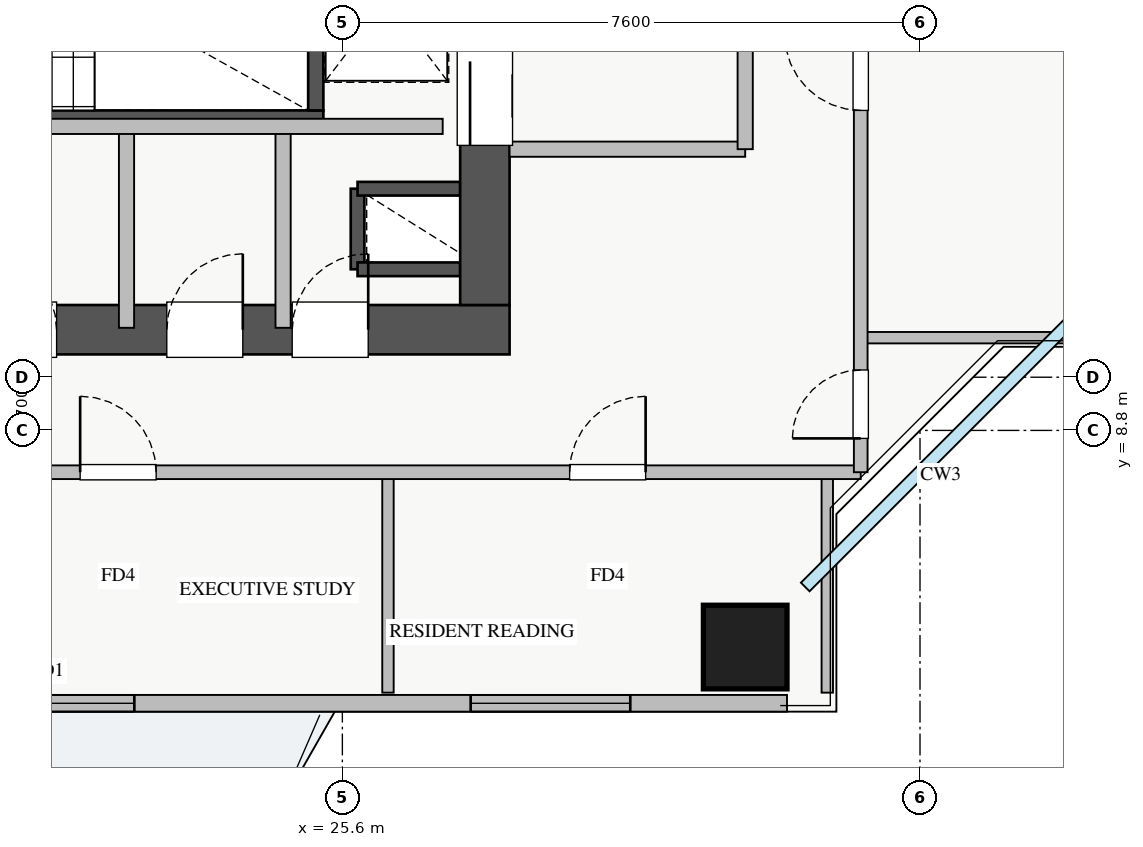
"""IFC4 building model, lengths in metres.
Left out: names, types, materials, properties, quantities, classifications, styles, units other than length and angle.
Written with IfcOpenShell. Run it as: python <this file> out.ifc"""

import sys

from ifc_helpers import new_model, si_unit, direction, frame, frame_2d, origin, origin_2d, place, context, subcontext, project, spatial, rectangle, extrude, source, transform, mapped, element, fill, save


model = new_model("IFC4")
c1 = context("Model", 3, precision=1e-05, world=origin(), true_north=direction((0.0, 1.0)))
c2 = subcontext(c1, "Body", "Model", "MODEL_VIEW")
j1 = project(units=[si_unit("LENGTHUNIT", "METRE"), si_unit("PLANEANGLEUNIT", "RADIAN")], contexts=[c1])
p1 = place(None, origin())
s1 = spatial("IfcSite", under=j1, at=p1, CompositionType="ELEMENT")
p2 = place(p1, origin())
s2 = spatial("IfcBuilding", under=s1, at=p2, CompositionType="ELEMENT")
p3 = place(p2, frame((0.0, 0.0, 119.75)))
s3 = spatial("IfcBuildingStorey", under=s2, at=p3, CompositionType="ELEMENT", Elevation=119.75)
p4 = place(p3, frame((25.8, 10.92, 0.0), z_axis=(0.0, 0.0, 1.0), x_axis=(0.0, 1.0, 0.0)))
e1 = element("IfcWall", 1, at=p4, inside=s3, PredefinedType="SHEAR", context=c2, shape_type="SweptSolid", body=[
    extrude(rectangle(XDim=1.06, YDim=0.18, at=frame_2d((0.53, 0.0))), origin(), (0.0, 0.0, 1.0), 3.07),
])
for number, where, z_axis, x_axis in (
    (2, (25.8, 11.98, 0.0), (0.0, 0.0, 1.0), (1.0, 0.0, 0.0)),
    (3, (25.8, 10.92, 0.0), (0.0, 0.0, 1.0), (1.0, 0.0, 0.0)),
):
    element("IfcWall", number, at=place(p3, frame(where, z_axis=z_axis, x_axis=x_axis)), inside=s3, PredefinedType="SHEAR", context=c2, shape_type="SweptSolid", body=[
        extrude(rectangle(XDim=1.35, YDim=0.18, at=frame_2d((0.675, 0.0))), origin(), (0.0, 0.0, 1.0), 3.07),
    ])
p5 = place(p3, frame((18.2, 12.91, 0.0), z_axis=(0.0, 0.0, 1.0), x_axis=(1.0, 0.0, 0.0)))
e4 = element("IfcWall", 4, at=p5, inside=s3, PredefinedType="SHEAR", context=c2, shape_type="SweptSolid", body=[
    extrude(rectangle(XDim=7.15, YDim=0.2, at=frame_2d((3.575, 0.0))), origin(), (0.0, 0.0, 1.0), 3.25),
])
p6 = place(p5, frame((0.35, 0.0, 0.0)))
e5 = element("IfcOpeningElement", 5, at=p6, cuts=e4, PredefinedType="OPENING", context=c2, shape_type="SweptSolid", body=[
    extrude(rectangle(XDim=1.1, YDim=2.05, at=frame_2d((0.55, 1.025))), frame((0.0, 0.11, 0.0), z_axis=(0.0, -1.0, 0.0), x_axis=(1.0, 0.0, 0.0)), (0.0, 0.0, 1.0), 0.22),
])
p7 = place(p3, frame((25.25, 13.01, 0.0), z_axis=(0.0, 0.0, 1.0), x_axis=(0.0, 1.0, 0.0)))
e6 = element("IfcWall", 6, at=p7, inside=s3, PredefinedType="SHEAR", context=c2, shape_type="SweptSolid", body=[
    extrude(rectangle(XDim=2.94, YDim=0.2, at=frame_2d((1.47, 0.0))), origin(), (0.0, 0.0, 1.0), 3.25),
])
p8 = place(p3, frame((10.2, 10.125, 0.0), z_axis=(0.0, 0.0, 1.0), x_axis=(1.0, 0.0, 0.0)))
e7 = element("IfcWall", 7, at=p8, inside=s3, PredefinedType="SHEAR", context=c2, shape_type="SweptSolid", body=[
    extrude(rectangle(XDim=17.6, YDim=0.65, at=frame_2d((8.8, 0.0))), origin(), (0.0, 0.0, 1.0), 3.25),
])
p9 = place(p8, frame((1.15, 0.0, 0.0)))
e8 = element("IfcOpeningElement", 8, at=p9, cuts=e7, PredefinedType="OPENING", context=c2, shape_type="SweptSolid", body=[
    extrude(rectangle(XDim=1.1, YDim=2.05, at=frame_2d((0.55, 1.025))), frame((0.0, 0.335, 0.0), z_axis=(0.0, -1.0, 0.0), x_axis=(1.0, 0.0, 0.0)), (0.0, 0.0, 1.0), 0.67),
])
p10 = place(p8, frame((8.3, 0.0, 0.0)))
e9 = element("IfcOpeningElement", 9, at=p10, cuts=e7, PredefinedType="OPENING", context=c2, shape_type="SweptSolid", body=[
    extrude(rectangle(XDim=1.1, YDim=2.05, at=frame_2d((0.55, 1.025))), frame((0.0, 0.335, 0.0), z_axis=(0.0, -1.0, 0.0), x_axis=(1.0, 0.0, 0.0)), (0.0, 0.0, 1.0), 0.67),
])
p11 = place(p8, frame((4.9, 0.0, 0.0)))
e10 = element("IfcOpeningElement", 10, at=p11, cuts=e7, PredefinedType="OPENING", context=c2, shape_type="SweptSolid", body=[
    extrude(rectangle(XDim=1.1, YDim=2.05, at=frame_2d((0.55, 1.025))), frame((0.0, 0.335, 0.0), z_axis=(0.0, -1.0, 0.0), x_axis=(1.0, 0.0, 0.0)), (0.0, 0.0, 1.0), 0.67),
])
p12 = place(p8, frame((14.74, 0.0, 0.0)))
e11 = element("IfcOpeningElement", 11, at=p12, cuts=e7, PredefinedType="OPENING", context=c2, shape_type="SweptSolid", body=[
    extrude(rectangle(XDim=1.0, YDim=2.05, at=frame_2d((0.5, 1.025))), frame((0.0, 0.335, 0.0), z_axis=(0.0, -1.0, 0.0), x_axis=(1.0, 0.0, 0.0)), (0.0, 0.0, 1.0), 0.67),
])
p13 = place(p8, frame((10.64, 0.0, 0.0)))
e12 = element("IfcOpeningElement", 12, at=p13, cuts=e7, PredefinedType="OPENING", context=c2, shape_type="SweptSolid", body=[
    extrude(rectangle(XDim=1.0, YDim=2.05, at=frame_2d((0.5, 1.025))), frame((0.0, 0.335, 0.0), z_axis=(0.0, -1.0, 0.0), x_axis=(1.0, 0.0, 0.0)), (0.0, 0.0, 1.0), 0.67),
])
p14 = place(p8, frame((13.09, 0.0, 0.0)))
e13 = element("IfcOpeningElement", 13, at=p14, cuts=e7, PredefinedType="OPENING", context=c2, shape_type="SweptSolid", body=[
    extrude(rectangle(XDim=1.0, YDim=2.05, at=frame_2d((0.5, 1.025))), frame((0.0, 0.335, 0.0), z_axis=(0.0, -1.0, 0.0), x_axis=(1.0, 0.0, 0.0)), (0.0, 0.0, 1.0), 0.67),
])
p15 = place(p3, frame((27.475, 10.45, 0.0), z_axis=(0.0, 0.0, 1.0), x_axis=(0.0, 1.0, 0.0)))
e14 = element("IfcWall", 14, at=p15, inside=s3, PredefinedType="SHEAR", context=c2, shape_type="SweptSolid", body=[
    extrude(rectangle(XDim=5.9, YDim=0.65, at=frame_2d((2.95, 0.0))), origin(), (0.0, 0.0, 1.0), 3.25),
])
p16 = place(p15, frame((2.1, 0.0, 0.0)))
e15 = element("IfcOpeningElement", 15, at=p16, cuts=e14, PredefinedType="OPENING", context=c2, shape_type="SweptSolid", body=[
    extrude(rectangle(XDim=1.3, YDim=2.05, at=frame_2d((0.65, 1.025))), frame((0.0, 0.335, 0.0), z_axis=(0.0, -1.0, 0.0), x_axis=(1.0, 0.0, 0.0)), (0.0, 0.0, 1.0), 0.67),
])
m1 = source(origin(), c2, "Body", "SweptSolid", [
    extrude(rectangle(XDim=1.1, YDim=1.1, at=origin_2d()), origin(), (0.0, 0.0, 1.0), 3.25),
])
p17 = place(p3, frame((30.9, 5.95, 0.0), z_axis=(0.0, 0.0, 1.0), x_axis=(1.0, 0.0, 0.0)))
e16 = element("IfcColumn", 16, at=p17, inside=s3, PredefinedType="COLUMN", context=c2, shape_type="MappedRepresentation", body=[
    mapped(m1, transform((0.0, 0.0, 0.0), x_axis=(1.0, 0.0, 0.0), y_axis=(0.0, 1.0, 0.0), z_axis=(0.0, 0.0, 1.0), scale=1.0)),
])
p18 = place(p3, frame((6.55, 5.21, 0.0), z_axis=(0.0, 0.0, 1.0), x_axis=(1.0, 0.0, 0.0)))
e17 = element("IfcWall", 17, at=p18, inside=s3, PredefinedType="STANDARD", context=c2, shape_type="SweptSolid", body=[
    extrude(rectangle(XDim=24.9, YDim=0.22, at=frame_2d((12.45, 0.0))), origin(), (0.0, 0.0, 1.0), 2.61),
])
p19 = place(p18, frame((13.3, 0.0, 0.0)))
e18 = element("IfcOpeningElement", 18, at=p19, cuts=e17, PredefinedType="OPENING", context=c2, shape_type="SweptSolid", body=[
    extrude(rectangle(XDim=1.2, YDim=2.1, at=frame_2d((0.6, 1.05))), frame((0.0, 0.12, 0.0), z_axis=(0.0, -1.0, 0.0), x_axis=(1.0, 0.0, 0.0)), (0.0, 0.0, 1.0), 0.24),
])
p20 = place(p18, frame((0.258, 0.0, 0.9)))
e19 = element("IfcOpeningElement", 19, at=p20, cuts=e17, PredefinedType="OPENING", context=c2, shape_type="SweptSolid", body=[
    extrude(rectangle(XDim=1.8, YDim=1.5, at=frame_2d((0.9, 0.75))), frame((0.0, 0.12, 0.0), z_axis=(0.0, -1.0, 0.0), x_axis=(1.0, 0.0, 0.0)), (0.0, 0.0, 1.0), 0.24),
])
p21 = place(p18, frame((9.775, 0.0, 0.9)))
e20 = element("IfcOpeningElement", 20, at=p21, cuts=e17, PredefinedType="OPENING", context=c2, shape_type="SweptSolid", body=[
    extrude(rectangle(XDim=1.8, YDim=1.5, at=frame_2d((0.9, 0.75))), frame((0.0, 0.12, 0.0), z_axis=(0.0, -1.0, 0.0), x_axis=(1.0, 0.0, 0.0)), (0.0, 0.0, 1.0), 0.24),
])
p22 = place(p18, frame((14.813, 0.0, 0.9)))
e21 = element("IfcOpeningElement", 21, at=p22, cuts=e17, PredefinedType="OPENING", context=c2, shape_type="SweptSolid", body=[
    extrude(rectangle(XDim=1.5, YDim=1.45, at=frame_2d((0.75, 0.725))), frame((0.0, 0.12, 0.0), z_axis=(0.0, -1.0, 0.0), x_axis=(1.0, 0.0, 0.0)), (0.0, 0.0, 1.0), 0.24),
])
p23 = place(p18, frame((20.738, 0.0, 0.9)))
e22 = element("IfcOpeningElement", 22, at=p23, cuts=e17, PredefinedType="OPENING", context=c2, shape_type="SweptSolid", body=[
    extrude(rectangle(XDim=2.1, YDim=1.48, at=frame_2d((1.05, 0.74))), frame((0.0, 0.12, 0.0), z_axis=(0.0, -1.0, 0.0), x_axis=(1.0, 0.0, 0.0)), (0.0, 0.0, 1.0), 0.24),
])
p24 = place(p18, frame((4.187, 0.0, 0.9)))
e23 = element("IfcOpeningElement", 23, at=p24, cuts=e17, PredefinedType="OPENING", context=c2, shape_type="SweptSolid", body=[
    extrude(rectangle(XDim=2.4, YDim=1.5, at=frame_2d((1.2, 0.75))), frame((0.0, 0.12, 0.0), z_axis=(0.0, -1.0, 0.0), x_axis=(1.0, 0.0, 0.0)), (0.0, 0.0, 1.0), 0.24),
])
p25 = place(p3, frame((27.8, 12.5, 0.0), z_axis=(0.0, 0.0, 1.0), x_axis=(1.0, 0.0, 0.0)))
e24 = element("IfcWall", 24, at=p25, inside=s3, PredefinedType="PARTITIONING", context=c2, shape_type="SweptSolid", body=[
    extrude(rectangle(XDim=3.1, YDim=0.2, at=frame_2d((1.55, 0.0))), origin(), (0.0, 0.0, 1.0), 3.07),
])
p26 = place(p3, frame((30.9, 12.5, 0.0), z_axis=(0.0, 0.0, 1.0), x_axis=(0.0, 1.0, 0.0)))
e25 = element("IfcWall", 25, at=p26, inside=s3, PredefinedType="PARTITIONING", context=c2, shape_type="SweptSolid", body=[
    extrude(rectangle(XDim=3.9, YDim=0.2, at=frame_2d((1.95, 0.0))), origin(), (0.0, 0.0, 1.0), 3.07),
])
p27 = place(p26, frame((1.4, 0.0, 0.0)))
e26 = element("IfcOpeningElement", 26, at=p27, cuts=e25, PredefinedType="OPENING", context=c2, shape_type="SweptSolid", body=[
    extrude(rectangle(XDim=1.1, YDim=2.05, at=frame_2d((0.55, 1.025))), frame((0.0, 0.11, 0.0), z_axis=(0.0, -1.0, 0.0), x_axis=(1.0, 0.0, 0.0)), (0.0, 0.0, 1.0), 0.22),
])
for number, where, z_axis, x_axis in (
    (27, (24.82, 10.15, 0.0), (0.0, 0.0, 1.0), (0.0, 1.0, 0.0)),
    (28, (22.76, 10.15, 0.0), (0.0, 0.0, 1.0), (0.0, 1.0, 0.0)),
):
    element("IfcWall", number, at=place(p3, frame(where, z_axis=z_axis, x_axis=x_axis)), inside=s3, PredefinedType="PARTITIONING", context=c2, shape_type="SweptSolid", body=[
        extrude(rectangle(XDim=2.65, YDim=0.2, at=frame_2d((1.325, 0.0))), origin(), (0.0, 0.0, 1.0), 3.07),
    ])
p28 = place(p3, frame((21.75, 12.8, 0.0), z_axis=(0.0, 0.0, 1.0), x_axis=(1.0, 0.0, 0.0)))
e29 = element("IfcWall", 29, at=p28, inside=s3, PredefinedType="PARTITIONING", context=c2, shape_type="SweptSolid", body=[
    extrude(rectangle(XDim=5.17, YDim=0.2, at=frame_2d((2.585, 0.0))), origin(), (0.0, 0.0, 1.0), 3.07),
])
for number, where, z_axis, x_axis in (
    (30, (26.2, 5.35, 0.0), (0.0, 0.0, 1.0), (0.0, 1.0, 0.0)),
    (31, (31.98, 5.35, 0.0), (0.0, 0.0, 1.0), (0.0, 1.0, 0.0)),
):
    element("IfcWall", number, at=place(p3, frame(where, z_axis=z_axis, x_axis=x_axis)), inside=s3, PredefinedType="PARTITIONING", context=c2, shape_type="SweptSolid", body=[
        extrude(rectangle(XDim=2.9, YDim=0.15, at=frame_2d((1.45, 0.0))), origin(), (0.0, 0.0, 1.0), 3.07),
    ])
p29 = place(p3, frame((8.85, 8.25, 0.0), z_axis=(0.0, 0.0, 1.0), x_axis=(1.0, 0.0, 0.0)))
e32 = element("IfcWall", 32, at=p29, inside=s3, PredefinedType="PARTITIONING", context=c2, shape_type="SweptSolid", body=[
    extrude(rectangle(XDim=23.57, YDim=0.18, at=frame_2d((11.785, 0.0))), origin(), (0.0, 0.0, 1.0), 3.07),
])
p30 = place(p29, frame((2.75, 0.0, 0.0)))
e33 = element("IfcOpeningElement", 33, at=p30, cuts=e32, PredefinedType="OPENING", context=c2, shape_type="SweptSolid", body=[
    extrude(rectangle(XDim=1.0, YDim=2.05, at=frame_2d((0.5, 1.025))), frame((0.0, 0.1, 0.0), z_axis=(0.0, -1.0, 0.0), x_axis=(1.0, 0.0, 0.0)), (0.0, 0.0, 1.0), 0.2),
])
p31 = place(p29, frame((7.875, 0.0, 0.0)))
e34 = element("IfcOpeningElement", 34, at=p31, cuts=e32, PredefinedType="OPENING", context=c2, shape_type="SweptSolid", body=[
    extrude(rectangle(XDim=1.0, YDim=2.05, at=frame_2d((0.5, 1.025))), frame((0.0, 0.1, 0.0), z_axis=(0.0, -1.0, 0.0), x_axis=(1.0, 0.0, 0.0)), (0.0, 0.0, 1.0), 0.2),
])
p32 = place(p29, frame((13.3, 0.0, 0.0)))
e35 = element("IfcOpeningElement", 35, at=p32, cuts=e32, PredefinedType="OPENING", context=c2, shape_type="SweptSolid", body=[
    extrude(rectangle(XDim=1.0, YDim=2.05, at=frame_2d((0.5, 1.025))), frame((0.0, 0.1, 0.0), z_axis=(0.0, -1.0, 0.0), x_axis=(1.0, 0.0, 0.0)), (0.0, 0.0, 1.0), 0.2),
])
p33 = place(p29, frame((19.74, 0.0, 0.0)))
e36 = element("IfcOpeningElement", 36, at=p33, cuts=e32, PredefinedType="OPENING", context=c2, shape_type="SweptSolid", body=[
    extrude(rectangle(XDim=1.0, YDim=2.05, at=frame_2d((0.5, 1.025))), frame((0.0, 0.1, 0.0), z_axis=(0.0, -1.0, 0.0), x_axis=(1.0, 0.0, 0.0)), (0.0, 0.0, 1.0), 0.2),
])
p34 = place(p3, frame((32.42, 10.02, 0.0), z_axis=(0.0, 0.0, 1.0), x_axis=(1.0, 0.0, 0.0)))
e37 = element("IfcWall", 37, at=p34, inside=s3, PredefinedType="PARTITIONING", context=c2, shape_type="SweptSolid", body=[
    extrude(rectangle(XDim=4.23, YDim=0.15, at=frame_2d((2.115, 0.0))), origin(), (0.0, 0.0, 1.0), 3.07),
])
p35 = place(p3, frame((32.42, 8.25, 0.0), z_axis=(0.0, 0.0, 1.0), x_axis=(0.0, 1.0, 0.0)))
e38 = element("IfcWall", 38, at=p35, inside=s3, PredefinedType="PARTITIONING", context=c2, shape_type="SweptSolid", body=[
    extrude(rectangle(XDim=29.5, YDim=0.18, at=frame_2d((14.75, 0.0))), origin(), (0.0, 0.0, 1.0), 3.07),
])
p36 = place(p35, frame((28.155, 0.0, 0.0)))
e39 = element("IfcOpeningElement", 39, at=p36, cuts=e38, PredefinedType="OPENING", context=c2, shape_type="SweptSolid", body=[
    extrude(rectangle(XDim=0.9, YDim=2.05, at=frame_2d((0.45, 1.025))), frame((0.0, 0.1, 0.0), z_axis=(0.0, -1.0, 0.0), x_axis=(1.0, 0.0, 0.0)), (0.0, 0.0, 1.0), 0.2),
])
p37 = place(p35, frame((0.445, 0.0, 0.0)))
e40 = element("IfcOpeningElement", 40, at=p37, cuts=e38, PredefinedType="OPENING", context=c2, shape_type="SweptSolid", body=[
    extrude(rectangle(XDim=0.9, YDim=2.05, at=frame_2d((0.45, 1.025))), frame((0.0, 0.1, 0.0), z_axis=(0.0, -1.0, 0.0), x_axis=(1.0, 0.0, 0.0)), (0.0, 0.0, 1.0), 0.2),
])
p38 = place(p35, frame((4.76, 0.0, 0.0)))
e41 = element("IfcOpeningElement", 41, at=p38, cuts=e38, PredefinedType="OPENING", context=c2, shape_type="SweptSolid", body=[
    extrude(rectangle(XDim=1.0, YDim=2.05, at=frame_2d((0.5, 1.025))), frame((0.0, 0.1, 0.0), z_axis=(0.0, -1.0, 0.0), x_axis=(1.0, 0.0, 0.0)), (0.0, 0.0, 1.0), 0.2),
])
p39 = place(p35, frame((18.04, 0.0, 0.0)))
e42 = element("IfcOpeningElement", 42, at=p39, cuts=e38, PredefinedType="OPENING", context=c2, shape_type="SweptSolid", body=[
    extrude(rectangle(XDim=1.0, YDim=2.05, at=frame_2d((0.5, 1.025))), frame((0.0, 0.1, 0.0), z_axis=(0.0, -1.0, 0.0), x_axis=(1.0, 0.0, 0.0)), (0.0, 0.0, 1.0), 0.2),
])
m2 = source(origin(), c2, "Body", "SweptSolid", [
    extrude(rectangle(XDim=1.5, YDim=1.45, at=frame_2d((0.75, 0.725))), frame((0.0, 0.03, 0.0), z_axis=(0.0, -1.0, 0.0), x_axis=(1.0, 0.0, 0.0)), (0.0, 0.0, 1.0), 0.06),
])
p40 = place(p22, origin())
e43 = element("IfcWindow", 43, at=p40, inside=s3, PartitioningType="DOUBLE_PANEL_VERTICAL", PredefinedType="WINDOW", context=c2, shape_type="MappedRepresentation", body=[
    mapped(m2, transform((0.0, 0.0, 0.0), x_axis=(1.0, 0.0, 0.0), y_axis=(0.0, 1.0, 0.0), z_axis=(0.0, 0.0, 1.0), scale=1.0)),
])
fill(e21, e43)
m3 = source(origin(), c2, "Body", "SweptSolid", [
    extrude(rectangle(XDim=2.1, YDim=1.48, at=frame_2d((1.05, 0.74))), frame((0.0, 0.03, 0.0), z_axis=(0.0, -1.0, 0.0), x_axis=(1.0, 0.0, 0.0)), (0.0, 0.0, 1.0), 0.06),
])
p41 = place(p23, origin())
e44 = element("IfcWindow", 44, at=p41, inside=s3, PartitioningType="TRIPLE_PANEL_VERTICAL", PredefinedType="WINDOW", context=c2, shape_type="MappedRepresentation", body=[
    mapped(m3, transform((0.0, 0.0, 0.0), x_axis=(1.0, 0.0, 0.0), y_axis=(0.0, 1.0, 0.0), z_axis=(0.0, 0.0, 1.0), scale=1.0)),
])
fill(e22, e44)
m4 = source(origin(), c2, "Body", "SweptSolid", [
    extrude(rectangle(XDim=1.3, YDim=2.05, at=frame_2d((0.65, 1.025))), frame((0.0, 0.025, 0.0), z_axis=(0.0, -1.0, 0.0), x_axis=(1.0, 0.0, 0.0)), (0.0, 0.0, 1.0), 0.05),
])
p42 = place(p16, origin())
e45 = element("IfcDoor", 45, at=p42, inside=s3, OperationType="SLIDING_TO_RIGHT", PredefinedType="DOOR", context=c2, shape_type="MappedRepresentation", body=[
    mapped(m4, transform((0.0, 0.0, 0.0), x_axis=(1.0, 0.0, 0.0), y_axis=(0.0, 1.0, 0.0), z_axis=(0.0, 0.0, 1.0), scale=1.0)),
])
fill(e15, e45)
m5 = source(origin(), c2, "Body", "SweptSolid", [
    extrude(rectangle(XDim=1.0, YDim=2.05, at=frame_2d((0.5, 1.025))), frame((0.0, 0.025, 0.0), z_axis=(0.0, -1.0, 0.0), x_axis=(1.0, 0.0, 0.0)), (0.0, 0.0, 1.0), 0.05),
])
p43 = place(p12, origin())
e46 = element("IfcDoor", 46, at=p43, inside=s3, OperationType="SINGLE_SWING_RIGHT", PredefinedType="DOOR", context=c2, shape_type="MappedRepresentation", body=[
    mapped(m5, transform((0.0, 0.0, 0.0), x_axis=(1.0, 0.0, 0.0), y_axis=(0.0, 1.0, 0.0), z_axis=(0.0, 0.0, 1.0), scale=1.0)),
])
fill(e11, e46)
p44 = place(p13, origin())
e47 = element("IfcDoor", 47, at=p44, inside=s3, OperationType="SINGLE_SWING_LEFT", PredefinedType="DOOR", context=c2, shape_type="MappedRepresentation", body=[
    mapped(m5, transform((0.0, 0.0, 0.0), x_axis=(1.0, 0.0, 0.0), y_axis=(0.0, 1.0, 0.0), z_axis=(0.0, 0.0, 1.0), scale=1.0)),
])
fill(e12, e47)
p45 = place(p14, origin())
e48 = element("IfcDoor", 48, at=p45, inside=s3, OperationType="SINGLE_SWING_RIGHT", PredefinedType="DOOR", context=c2, shape_type="MappedRepresentation", body=[
    mapped(m5, transform((0.0, 0.0, 0.0), x_axis=(1.0, 0.0, 0.0), y_axis=(0.0, 1.0, 0.0), z_axis=(0.0, 0.0, 1.0), scale=1.0)),
])
fill(e13, e48)
p46 = place(p32, origin())
e49 = element("IfcDoor", 49, at=p46, inside=s3, OperationType="SINGLE_SWING_LEFT", PredefinedType="DOOR", context=c2, shape_type="MappedRepresentation", body=[
    mapped(m5, transform((0.0, 0.0, 0.0), x_axis=(1.0, 0.0, 0.0), y_axis=(0.0, 1.0, 0.0), z_axis=(0.0, 0.0, 1.0), scale=1.0)),
])
fill(e35, e49)
p47 = place(p33, origin())
e50 = element("IfcDoor", 50, at=p47, inside=s3, OperationType="SINGLE_SWING_RIGHT", PredefinedType="DOOR", context=c2, shape_type="MappedRepresentation", body=[
    mapped(m5, transform((0.0, 0.0, 0.0), x_axis=(1.0, 0.0, 0.0), y_axis=(0.0, 1.0, 0.0), z_axis=(0.0, 0.0, 1.0), scale=1.0)),
])
fill(e36, e50)
m6 = source(origin(), c2, "Body", "SweptSolid", [
    extrude(rectangle(XDim=0.9, YDim=2.05, at=frame_2d((0.45, 1.025))), frame((0.0, 0.025, 0.0), z_axis=(0.0, -1.0, 0.0), x_axis=(1.0, 0.0, 0.0)), (0.0, 0.0, 1.0), 0.05),
])
p48 = place(p37, origin())
e51 = element("IfcDoor", 51, at=p48, inside=s3, OperationType="SINGLE_SWING_LEFT", PredefinedType="DOOR", context=c2, shape_type="MappedRepresentation", body=[
    mapped(m6, transform((0.0, 0.0, 0.0), x_axis=(1.0, 0.0, 0.0), y_axis=(0.0, 1.0, 0.0), z_axis=(0.0, 0.0, 1.0), scale=1.0)),
])
fill(e40, e51)
p49 = place(p38, origin())
e52 = element("IfcDoor", 52, at=p49, inside=s3, OperationType="SINGLE_SWING_RIGHT", PredefinedType="DOOR", context=c2, shape_type="MappedRepresentation", body=[
    mapped(m5, transform((0.0, 0.0, 0.0), x_axis=(1.0, 0.0, 0.0), y_axis=(0.0, 1.0, 0.0), z_axis=(0.0, 0.0, 1.0), scale=1.0)),
])
fill(e41, e52)
save(model, sys.argv[1])
